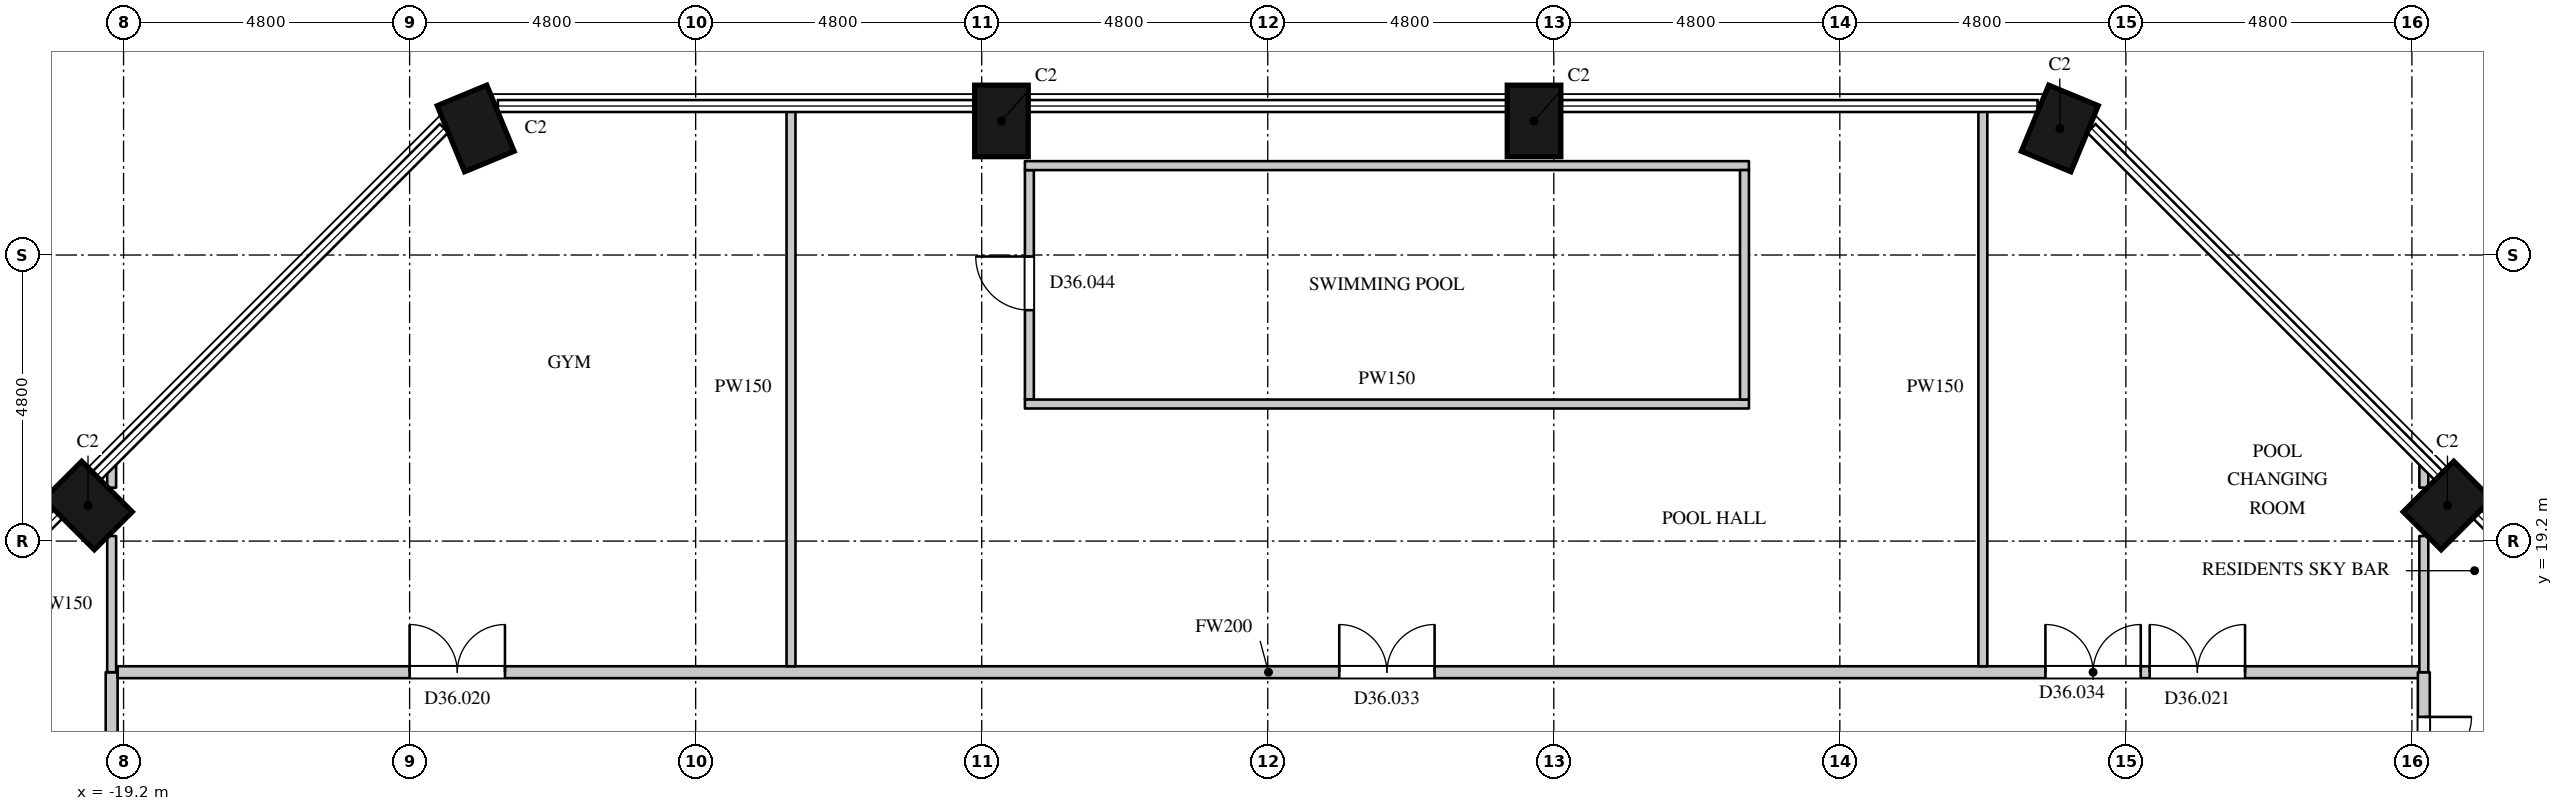
"""IFC4 building model, lengths in metres.
Left out: names, types, materials, properties, quantities, classifications, styles, units other than length and angle.
Written with IfcOpenShell. Run it as: python <this file> out.ifc"""

import sys

from ifc_helpers import new_model, si_unit, direction, frame, frame_2d, origin, origin_2d, place, context, subcontext, project, spatial, rectangle, extrude, element, fill, save


model = new_model("IFC4")
c1 = context("Model", 3, precision=1e-05, world=origin(), true_north=direction((0.0, 1.0)))
c2 = subcontext(c1, "Body", "Model", "MODEL_VIEW")
j1 = project(units=[si_unit("LENGTHUNIT", "METRE"), si_unit("PLANEANGLEUNIT", "RADIAN")], contexts=[c1])
p1 = place(None, origin())
s1 = spatial("IfcSite", under=j1, at=p1, CompositionType="ELEMENT")
p2 = place(p1, origin())
s2 = spatial("IfcBuilding", under=s1, at=p2, CompositionType="ELEMENT")
p3 = place(p2, frame((0.0, 0.0, 156.9)))
s3 = spatial("IfcBuildingStorey", under=s2, at=p3, CompositionType="ELEMENT", Elevation=156.9)
for number, where, z_axis, x_axis in (
    (1, (19.797, 19.797, 0.0), (0.0, 0.0, 1.0), (-0.707, 0.707, 0.0)),
    (2, (13.291, 26.124, 0.0), (0.0, 0.0, 1.0), (-0.924, 0.383, 0.0)),
    (3, (4.469, 26.25, 0.0), (0.0, 0.0, 1.0), (-1.0, 0.0, 0.0)),
    (4, (-4.469, 26.25, 0.0), (0.0, 0.0, 1.0), (-1.0, 0.0, 0.0)),
    (5, (-13.291, 26.124, 0.0), (0.0, 0.0, 1.0), (-0.924, -0.383, 0.0)),
    (6, (-19.797, 19.797, 0.0), (0.0, 0.0, 1.0), (-0.707, -0.707, 0.0)),
):
    element("IfcColumn", number, at=place(p3, frame(where, z_axis=z_axis, x_axis=x_axis)), inside=s3, PredefinedType="COLUMN", context=c2, shape_type="SweptSolid", body=[
        extrude(rectangle(XDim=0.9, YDim=1.2, at=origin_2d()), origin(), (0.0, 0.0, 1.0), 5.4),
    ])
p4 = place(p3, frame((-19.4, -17.0, 0.0), z_axis=(0.0, 0.0, 1.0), x_axis=(0.0, 1.0, 0.0)))
e7 = element("IfcWall", 7, at=p4, inside=s3, PredefinedType="PARTITIONING", context=c2, shape_type="SweptSolid", body=[
    extrude(rectangle(XDim=34.0, YDim=0.2, at=frame_2d((17.0, 0.0))), origin(), (0.0, 0.0, 1.0), 5.1),
])
p5 = place(p4, frame((1.75, 0.0, 0.0)))
e8 = element("IfcOpeningElement", 8, at=p5, cuts=e7, PredefinedType="OPENING", context=c2, shape_type="SweptSolid", body=[
    extrude(rectangle(XDim=1.6, YDim=2.4, at=frame_2d((0.8, 1.2))), frame((0.0, 0.11, 0.0), z_axis=(0.0, -1.0, 0.0), x_axis=(1.0, 0.0, 0.0)), (0.0, 0.0, 1.0), 0.22),
])
p6 = place(p4, frame((8.2, 0.0, 0.0)))
e9 = element("IfcOpeningElement", 9, at=p6, cuts=e7, PredefinedType="OPENING", context=c2, shape_type="SweptSolid", body=[
    extrude(rectangle(XDim=1.6, YDim=2.4, at=frame_2d((0.8, 1.2))), frame((0.0, 0.11, 0.0), z_axis=(0.0, -1.0, 0.0), x_axis=(1.0, 0.0, 0.0)), (0.0, 0.0, 1.0), 0.22),
])
p7 = place(p4, frame((16.2, 0.0, 0.0)))
e10 = element("IfcOpeningElement", 10, at=p7, cuts=e7, PredefinedType="OPENING", context=c2, shape_type="SweptSolid", body=[
    extrude(rectangle(XDim=1.6, YDim=2.4, at=frame_2d((0.8, 1.2))), frame((0.0, 0.11, 0.0), z_axis=(0.0, -1.0, 0.0), x_axis=(1.0, 0.0, 0.0)), (0.0, 0.0, 1.0), 0.22),
])
p8 = place(p4, frame((24.2, 0.0, 0.0)))
e11 = element("IfcOpeningElement", 11, at=p8, cuts=e7, PredefinedType="OPENING", context=c2, shape_type="SweptSolid", body=[
    extrude(rectangle(XDim=1.6, YDim=2.4, at=frame_2d((0.8, 1.2))), frame((0.0, 0.11, 0.0), z_axis=(0.0, -1.0, 0.0), x_axis=(1.0, 0.0, 0.0)), (0.0, 0.0, 1.0), 0.22),
])
p9 = place(p4, frame((30.65, 0.0, 0.0)))
e12 = element("IfcOpeningElement", 12, at=p9, cuts=e7, PredefinedType="OPENING", context=c2, shape_type="SweptSolid", body=[
    extrude(rectangle(XDim=1.6, YDim=2.4, at=frame_2d((0.8, 1.2))), frame((0.0, 0.11, 0.0), z_axis=(0.0, -1.0, 0.0), x_axis=(1.0, 0.0, 0.0)), (0.0, 0.0, 1.0), 0.22),
])
p10 = place(p3, frame((-19.3, 17.0, 0.0), z_axis=(0.0, 0.0, 1.0), x_axis=(1.0, 0.0, 0.0)))
e13 = element("IfcWall", 13, at=p10, inside=s3, PredefinedType="PARTITIONING", context=c2, shape_type="SweptSolid", body=[
    extrude(rectangle(XDim=38.625, YDim=0.2, at=frame_2d((19.312, 0.0))), origin(), (0.0, 0.0, 1.0), 5.1),
])
p11 = place(p10, frame((4.9, 0.0, 0.0)))
e14 = element("IfcOpeningElement", 14, at=p11, cuts=e13, PredefinedType="OPENING", context=c2, shape_type="SweptSolid", body=[
    extrude(rectangle(XDim=1.6, YDim=2.4, at=frame_2d((0.8, 1.2))), frame((0.0, 0.11, 0.0), z_axis=(0.0, -1.0, 0.0), x_axis=(1.0, 0.0, 0.0)), (0.0, 0.0, 1.0), 0.22),
])
p12 = place(p10, frame((34.1, 0.0, 0.0)))
e15 = element("IfcOpeningElement", 15, at=p12, cuts=e13, PredefinedType="OPENING", context=c2, shape_type="SweptSolid", body=[
    extrude(rectangle(XDim=1.6, YDim=2.4, at=frame_2d((0.8, 1.2))), frame((0.0, 0.11, 0.0), z_axis=(0.0, -1.0, 0.0), x_axis=(1.0, 0.0, 0.0)), (0.0, 0.0, 1.0), 0.22),
])
p13 = place(p10, frame((20.5, 0.0, 0.0)))
e16 = element("IfcOpeningElement", 16, at=p13, cuts=e13, PredefinedType="OPENING", context=c2, shape_type="SweptSolid", body=[
    extrude(rectangle(XDim=1.6, YDim=2.4, at=frame_2d((0.8, 1.2))), frame((0.0, 0.11, 0.0), z_axis=(0.0, -1.0, 0.0), x_axis=(1.0, 0.0, 0.0)), (0.0, 0.0, 1.0), 0.22),
])
p14 = place(p10, frame((32.35, 0.0, 0.0)))
e17 = element("IfcOpeningElement", 17, at=p14, cuts=e13, PredefinedType="OPENING", context=c2, shape_type="SweptSolid", body=[
    extrude(rectangle(XDim=1.6, YDim=2.4, at=frame_2d((0.8, 1.2))), frame((0.0, 0.11, 0.0), z_axis=(0.0, -1.0, 0.0), x_axis=(1.0, 0.0, 0.0)), (0.0, 0.0, 1.0), 0.22),
])
p15 = place(p3, frame((19.4, -17.0, 0.0), z_axis=(0.0, 0.0, 1.0), x_axis=(0.0, 1.0, 0.0)))
e18 = element("IfcWall", 18, at=p15, inside=s3, PredefinedType="PARTITIONING", context=c2, shape_type="SweptSolid", body=[
    extrude(rectangle(XDim=34.0, YDim=0.2, at=frame_2d((17.0, 0.0))), origin(), (0.0, 0.0, 1.0), 5.1),
])
p16 = place(p15, frame((0.75, 0.0, 0.0)))
e19 = element("IfcOpeningElement", 19, at=p16, cuts=e18, PredefinedType="OPENING", context=c2, shape_type="SweptSolid", body=[
    extrude(rectangle(XDim=1.6, YDim=2.4, at=frame_2d((0.8, 1.2))), frame((0.0, 0.11, 0.0), z_axis=(0.0, -1.0, 0.0), x_axis=(1.0, 0.0, 0.0)), (0.0, 0.0, 1.0), 0.22),
])
p17 = place(p15, frame((5.2, 0.0, 0.0)))
e20 = element("IfcOpeningElement", 20, at=p17, cuts=e18, PredefinedType="OPENING", context=c2, shape_type="SweptSolid", body=[
    extrude(rectangle(XDim=1.6, YDim=2.4, at=frame_2d((0.8, 1.2))), frame((0.0, 0.11, 0.0), z_axis=(0.0, -1.0, 0.0), x_axis=(1.0, 0.0, 0.0)), (0.0, 0.0, 1.0), 0.22),
])
p18 = place(p15, frame((12.2, 0.0, 0.0)))
e21 = element("IfcOpeningElement", 21, at=p18, cuts=e18, PredefinedType="OPENING", context=c2, shape_type="SweptSolid", body=[
    extrude(rectangle(XDim=1.6, YDim=2.4, at=frame_2d((0.8, 1.2))), frame((0.0, 0.11, 0.0), z_axis=(0.0, -1.0, 0.0), x_axis=(1.0, 0.0, 0.0)), (0.0, 0.0, 1.0), 0.22),
])
p19 = place(p15, frame((23.2, 0.0, 0.0)))
e22 = element("IfcOpeningElement", 22, at=p19, cuts=e18, PredefinedType="OPENING", context=c2, shape_type="SweptSolid", body=[
    extrude(rectangle(XDim=1.6, YDim=2.4, at=frame_2d((0.8, 1.2))), frame((0.0, 0.11, 0.0), z_axis=(0.0, -1.0, 0.0), x_axis=(1.0, 0.0, 0.0)), (0.0, 0.0, 1.0), 0.22),
])
p20 = place(p15, frame((31.65, 0.0, 0.0)))
e23 = element("IfcOpeningElement", 23, at=p20, cuts=e18, PredefinedType="OPENING", context=c2, shape_type="SweptSolid", body=[
    extrude(rectangle(XDim=1.6, YDim=2.4, at=frame_2d((0.8, 1.2))), frame((0.0, 0.11, 0.0), z_axis=(0.0, -1.0, 0.0), x_axis=(1.0, 0.0, 0.0)), (0.0, 0.0, 1.0), 0.22),
])
p21 = place(p15, frame((4.15, 0.0, 0.0)))
e24 = element("IfcOpeningElement", 24, at=p21, cuts=e18, PredefinedType="OPENING", context=c2, shape_type="SweptSolid", body=[
    extrude(rectangle(XDim=0.9, YDim=2.2, at=frame_2d((0.45, 1.1))), frame((0.0, 0.11, 0.0), z_axis=(0.0, -1.0, 0.0), x_axis=(1.0, 0.0, 0.0)), (0.0, 0.0, 1.0), 0.22),
])
p22 = place(p3, frame((-19.4, 17.0, 0.0), z_axis=(0.0, 0.0, 1.0), x_axis=(0.0, 1.0, 0.0)))
e25 = element("IfcWall", 25, at=p22, inside=s3, PredefinedType="PARTITIONING", context=c2, shape_type="SweptSolid", body=[
    extrude(rectangle(XDim=2.285, YDim=0.15, at=frame_2d((1.143, 0.0))), origin(), (0.0, 0.0, 1.0), 5.1),
])
p23 = place(p3, frame((-19.4, 20.096, 0.0), z_axis=(0.0, 0.0, 1.0), x_axis=(0.0, 1.0, 0.0)))
e26 = element("IfcWall", 26, at=p23, inside=s3, PredefinedType="PARTITIONING", context=c2, shape_type="SweptSolid", body=[
    extrude(rectangle(XDim=0.387, YDim=0.15, at=frame_2d((0.194, 0.0))), origin(), (0.0, 0.0, 1.0), 5.1),
])
p24 = place(p3, frame((-8.0, 17.1, 0.0), z_axis=(0.0, 0.0, 1.0), x_axis=(0.0, 1.0, 0.0)))
e27 = element("IfcWall", 27, at=p24, inside=s3, PredefinedType="PARTITIONING", context=c2, shape_type="SweptSolid", body=[
    extrude(rectangle(XDim=9.355, YDim=0.15, at=frame_2d((4.677, 0.0))), origin(), (0.0, 0.0, 1.0), 5.1),
])
p25 = place(p3, frame((-4.0, 21.575, 0.0), z_axis=(0.0, 0.0, 1.0), x_axis=(0.0, 1.0, 0.0)))
e28 = element("IfcWall", 28, at=p25, inside=s3, PredefinedType="PARTITIONING", context=c2, shape_type="SweptSolid", body=[
    extrude(rectangle(XDim=3.85, YDim=0.15, at=frame_2d((1.925, 0.0))), origin(), (0.0, 0.0, 1.0), 3.35),
])
p26 = place(p25, frame((1.5, 0.0, 0.0)))
e29 = element("IfcOpeningElement", 29, at=p26, cuts=e28, PredefinedType="OPENING", context=c2, shape_type="SweptSolid", body=[
    extrude(rectangle(XDim=0.9, YDim=2.2, at=frame_2d((0.45, 1.1))), frame((0.0, 0.085, 0.0), z_axis=(0.0, -1.0, 0.0), x_axis=(1.0, 0.0, 0.0)), (0.0, 0.0, 1.0), 0.17),
])
for number, where, z_axis, x_axis in (
    (30, (-4.075, 21.5, 0.0), (0.0, 0.0, 1.0), (1.0, 0.0, 0.0)),
    (31, (-4.075, 25.5, 0.0), (0.0, 0.0, 1.0), (1.0, 0.0, 0.0)),
):
    element("IfcWall", number, at=place(p3, frame(where, z_axis=z_axis, x_axis=x_axis)), inside=s3, PredefinedType="PARTITIONING", context=c2, shape_type="SweptSolid", body=[
        extrude(rectangle(XDim=12.15, YDim=0.15, at=frame_2d((6.075, 0.0))), origin(), (0.0, 0.0, 1.0), 5.1),
    ])
p27 = place(p3, frame((8.0, 21.575, 0.0), z_axis=(0.0, 0.0, 1.0), x_axis=(0.0, 1.0, 0.0)))
e32 = element("IfcWall", 32, at=p27, inside=s3, PredefinedType="PARTITIONING", context=c2, shape_type="SweptSolid", body=[
    extrude(rectangle(XDim=3.85, YDim=0.15, at=frame_2d((1.925, 0.0))), origin(), (0.0, 0.0, 1.0), 5.1),
])
p28 = place(p3, frame((12.0, 17.1, 0.0), z_axis=(0.0, 0.0, 1.0), x_axis=(0.0, 1.0, 0.0)))
e33 = element("IfcWall", 33, at=p28, inside=s3, PredefinedType="PARTITIONING", context=c2, shape_type="SweptSolid", body=[
    extrude(rectangle(XDim=9.355, YDim=0.15, at=frame_2d((4.677, 0.0))), origin(), (0.0, 0.0, 1.0), 5.1),
])
p29 = place(p3, frame((19.4, 17.0, 0.0), z_axis=(0.0, 0.0, 1.0), x_axis=(0.0, 1.0, 0.0)))
e34 = element("IfcWall", 34, at=p29, inside=s3, PredefinedType="PARTITIONING", context=c2, shape_type="SweptSolid", body=[
    extrude(rectangle(XDim=2.285, YDim=0.15, at=frame_2d((1.143, 0.0))), origin(), (0.0, 0.0, 1.0), 5.1),
])
p30 = place(p3, frame((19.4, 20.096, 0.0), z_axis=(0.0, 0.0, 1.0), x_axis=(0.0, 1.0, 0.0)))
e35 = element("IfcWall", 35, at=p30, inside=s3, PredefinedType="PARTITIONING", context=c2, shape_type="SweptSolid", body=[
    extrude(rectangle(XDim=0.387, YDim=0.15, at=frame_2d((0.194, 0.0))), origin(), (0.0, 0.0, 1.0), 5.1),
])
p31 = place(p20, origin())
e36 = element("IfcDoor", 36, at=p31, inside=s3, OperationType="DOUBLE_DOOR_SINGLE_SWING", PredefinedType="DOOR", context=c2, shape_type="SweptSolid", body=[
    extrude(rectangle(XDim=1.6, YDim=2.4, at=frame_2d((0.8, 1.2))), frame((0.0, 0.025, 0.0), z_axis=(0.0, -1.0, 0.0), x_axis=(1.0, 0.0, 0.0)), (0.0, 0.0, 1.0), 0.05),
])
fill(e23, e36)
p32 = place(p11, origin())
e37 = element("IfcDoor", 37, at=p32, inside=s3, OperationType="DOUBLE_DOOR_SINGLE_SWING", PredefinedType="DOOR", context=c2, shape_type="SweptSolid", body=[
    extrude(rectangle(XDim=1.6, YDim=2.4, at=frame_2d((0.8, 1.2))), frame((0.0, 0.025, 0.0), z_axis=(0.0, -1.0, 0.0), x_axis=(1.0, 0.0, 0.0)), (0.0, 0.0, 1.0), 0.05),
])
fill(e14, e37)
p33 = place(p12, origin())
e38 = element("IfcDoor", 38, at=p33, inside=s3, OperationType="DOUBLE_DOOR_SINGLE_SWING", PredefinedType="DOOR", context=c2, shape_type="SweptSolid", body=[
    extrude(rectangle(XDim=1.6, YDim=2.4, at=frame_2d((0.8, 1.2))), frame((0.0, 0.025, 0.0), z_axis=(0.0, -1.0, 0.0), x_axis=(1.0, 0.0, 0.0)), (0.0, 0.0, 1.0), 0.05),
])
fill(e15, e38)
p34 = place(p13, origin())
e39 = element("IfcDoor", 39, at=p34, inside=s3, OperationType="DOUBLE_DOOR_SINGLE_SWING", PredefinedType="DOOR", context=c2, shape_type="SweptSolid", body=[
    extrude(rectangle(XDim=1.6, YDim=2.4, at=frame_2d((0.8, 1.2))), frame((0.0, 0.025, 0.0), z_axis=(0.0, -1.0, 0.0), x_axis=(1.0, 0.0, 0.0)), (0.0, 0.0, 1.0), 0.05),
])
fill(e16, e39)
p35 = place(p14, origin())
e40 = element("IfcDoor", 40, at=p35, inside=s3, OperationType="DOUBLE_DOOR_SINGLE_SWING", PredefinedType="DOOR", context=c2, shape_type="SweptSolid", body=[
    extrude(rectangle(XDim=1.6, YDim=2.4, at=frame_2d((0.8, 1.2))), frame((0.0, 0.025, 0.0), z_axis=(0.0, -1.0, 0.0), x_axis=(1.0, 0.0, 0.0)), (0.0, 0.0, 1.0), 0.05),
])
fill(e17, e40)
p36 = place(p26, origin())
e41 = element("IfcDoor", 41, at=p36, inside=s3, OperationType="SINGLE_SWING_RIGHT", PredefinedType="DOOR", context=c2, shape_type="SweptSolid", body=[
    extrude(rectangle(XDim=0.9, YDim=2.2, at=frame_2d((0.45, 1.1))), frame((0.0, 0.025, 0.0), z_axis=(0.0, -1.0, 0.0), x_axis=(1.0, 0.0, 0.0)), (0.0, 0.0, 1.0), 0.05),
])
fill(e29, e41)
save(model, sys.argv[1])
